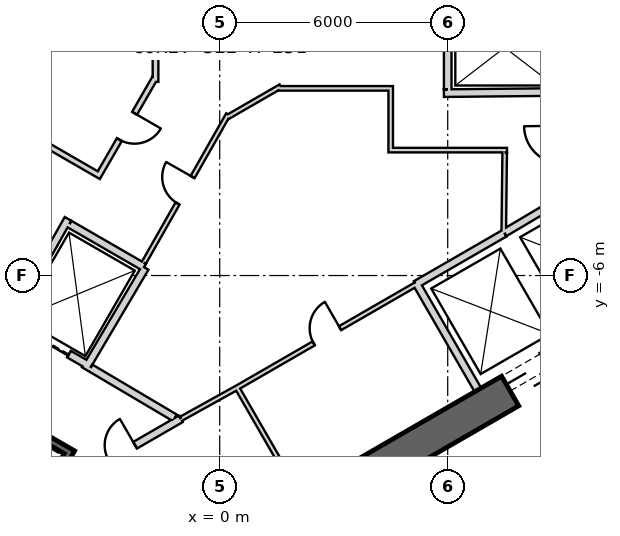
"""IFC4 building model, lengths in metres.
Left out: names, types, materials, properties, quantities, classifications, styles, units other than length and angle.
Written with IfcOpenShell. Run it as: python <this file> out.ifc"""

import sys

from ifc_helpers import new_model, si_unit, direction, frame, frame_2d, origin, place, context, subcontext, project, spatial, rectangle, extrude, element, fill, save


model = new_model("IFC4")
c1 = context("Model", 3, precision=1e-05, world=origin(), true_north=direction((0.0, 1.0)))
c2 = subcontext(c1, "Body", "Model", "MODEL_VIEW")
j1 = project(units=[si_unit("LENGTHUNIT", "METRE"), si_unit("PLANEANGLEUNIT", "RADIAN")], contexts=[c1])
p1 = place(None, origin())
s1 = spatial("IfcSite", under=j1, at=p1, CompositionType="ELEMENT")
p2 = place(p1, origin())
s2 = spatial("IfcBuilding", under=s1, at=p2, CompositionType="ELEMENT")
p3 = place(p2, frame((0.0, 0.0, 415.3)))
s3 = spatial("IfcBuildingStorey", under=s2, at=p3, CompositionType="ELEMENT", Elevation=415.3)
p4 = place(p3, frame((-7.825, -17.97, 0.0), z_axis=(0.0, 0.0, 1.0), x_axis=(0.866028369851, 0.499994862586, 0.0)))
e1 = element("IfcWall", 1, at=p4, inside=s3, PredefinedType="SHEAR", context=c2, shape_type="SweptSolid", body=[
    extrude(rectangle(XDim=31.523, YDim=0.9, at=frame_2d((15.762, 0.0))), origin(), (0.0, 0.0, 1.0), 5.0),
])
p5 = place(p4, frame((17.862, 0.0, 0.0)))
e2 = element("IfcOpeningElement", 2, at=p5, cuts=e1, PredefinedType="OPENING", context=c2, shape_type="SweptSolid", body=[
    extrude(rectangle(XDim=1.2, YDim=2.4, at=frame_2d((0.6, 1.2))), frame((0.0, 0.46, 0.0), z_axis=(0.0, -1.0, 0.0), x_axis=(1.0, 0.0, 0.0)), (0.0, 0.0, 1.0), 0.92),
])
p6 = place(p4, frame((20.562, 0.0, 0.0)))
e3 = element("IfcOpeningElement", 3, at=p6, cuts=e1, PredefinedType="OPENING", context=c2, shape_type="SweptSolid", body=[
    extrude(rectangle(XDim=1.2, YDim=2.4, at=frame_2d((0.6, 1.2))), frame((0.0, 0.46, 0.0), z_axis=(0.0, -1.0, 0.0), x_axis=(1.0, 0.0, 0.0)), (0.0, 0.0, 1.0), 0.92),
])
p7 = place(p4, frame((26.712, 0.0, 0.0)))
e4 = element("IfcOpeningElement", 4, at=p7, cuts=e1, PredefinedType="OPENING", context=c2, shape_type="SweptSolid", body=[
    extrude(rectangle(XDim=1.2, YDim=2.4, at=frame_2d((0.6, 1.2))), frame((0.0, 0.46, 0.0), z_axis=(0.0, -1.0, 0.0), x_axis=(1.0, 0.0, 0.0)), (0.0, 0.0, 1.0), 0.92),
])
p8 = place(p4, frame((3.612, 0.0, 0.0)))
e5 = element("IfcOpeningElement", 5, at=p8, cuts=e1, PredefinedType="OPENING", context=c2, shape_type="SweptSolid", body=[
    extrude(rectangle(XDim=1.2, YDim=2.4, at=frame_2d((0.6, 1.2))), frame((0.0, 0.46, 0.0), z_axis=(0.0, -1.0, 0.0), x_axis=(1.0, 0.0, 0.0)), (0.0, 0.0, 1.0), 0.92),
])
p9 = place(p3, frame((-1.098, -22.052, 0.0), z_axis=(0.0, 0.0, 1.0), x_axis=(0.824476827337, 0.565895715821, 0.0)))
e6 = element("IfcWall", 6, at=p9, inside=s3, PredefinedType="SOLIDWALL", context=c2, shape_type="SweptSolid", body=[
    extrude(rectangle(XDim=24.031, YDim=0.24, at=frame_2d((12.016, 0.0))), origin(), (0.0, 0.0, 1.0), 4.75),
])
p10 = place(p3, frame((20.109, -8.849, 0.04), z_axis=(0.0, 0.0, 1.0), x_axis=(-0.824476642241, -0.565895985494, 0.0)))
e7 = element("IfcWall", 7, at=p10, inside=s3, PredefinedType="PARAPET", context=c2, shape_type="SweptSolid", body=[
    extrude(rectangle(XDim=26.04, YDim=0.25, at=frame_2d((13.02, 0.0))), origin(), (0.0, 0.0, 1.0), 1.2),
])
p11 = place(p3, frame((19.357, -8.698, 0.04), z_axis=(0.0, 0.0, 1.0), x_axis=(-0.824477152259, -0.565895242428, 0.0)))
e8 = element("IfcWall", 8, at=p11, inside=s3, PredefinedType="PARAPET", context=c2, shape_type="SweptSolid", body=[
    extrude(rectangle(XDim=24.864, YDim=0.5, at=frame_2d((12.432, 0.0))), origin(), (0.0, 0.0, 1.0), 0.6),
])
p12 = place(p3, frame((6.795, -9.01, 0.0), z_axis=(0.0, 0.0, 1.0), x_axis=(-0.499984717929, 0.866034226713, 0.0)))
e9 = element("IfcWall", 9, at=p12, inside=s3, PredefinedType="PLUMBINGWALL", context=c2, shape_type="SweptSolid", body=[
    extrude(rectangle(XDim=3.25, YDim=0.2, at=frame_2d((1.625, 0.0))), origin(), (0.0, 0.0, 1.0), 4.75),
])
p13 = place(p3, frame((5.159, -6.236, 0.0), z_axis=(0.0, 0.0, 1.0), x_axis=(0.866036505625, 0.499980770555, 0.0)))
e10 = element("IfcWall", 10, at=p13, inside=s3, PredefinedType="PLUMBINGWALL", context=c2, shape_type="SweptSolid", body=[
    extrude(rectangle(XDim=2.7, YDim=0.2, at=frame_2d((1.35, 0.0))), origin(), (0.0, 0.0, 1.0), 4.75),
])
p14 = place(p3, frame((7.493, -4.878, 0.0), z_axis=(0.0, 0.0, 1.0), x_axis=(0.859981807212, 0.510324691999, 0.0)))
e11 = element("IfcWall", 11, at=p14, inside=s3, PredefinedType="PLUMBINGWALL", context=c2, shape_type="SweptSolid", body=[
    extrude(rectangle(XDim=1.845, YDim=0.2, at=frame_2d((0.922, 0.0))), origin(), (0.0, 0.0, 1.0), 4.75),
])
p15 = place(p3, frame((5.9, -1.201, 0.0), z_axis=(0.0, 0.0, 1.0), x_axis=(0.999950064753, 0.009993397809, 0.0)))
e12 = element("IfcWall", 12, at=p15, inside=s3, PredefinedType="PLUMBINGWALL", context=c2, shape_type="SweptSolid", body=[
    extrude(rectangle(XDim=3.2, YDim=0.2, at=frame_2d((1.6, 0.0))), origin(), (0.0, 0.0, 1.0), 4.75),
])
p16 = place(p3, frame((6.0, -1.1, 0.0), z_axis=(0.0, 0.0, 1.0), x_axis=(0.0, 1.0, 0.0)))
e13 = element("IfcWall", 13, at=p16, inside=s3, PredefinedType="PLUMBINGWALL", context=c2, shape_type="SweptSolid", body=[
    extrude(rectangle(XDim=2.28, YDim=0.2, at=frame_2d((1.14, 0.0))), origin(), (0.0, 0.0, 1.0), 4.75),
])
p17 = place(p3, frame((-3.905, -10.563, -0.25), z_axis=(0.0, 0.0, 1.0), x_axis=(-0.500012932018, -0.866017937352, 0.0)))
e14 = element("IfcWall", 14, at=p17, inside=s3, PredefinedType="SHEAR", context=c2, shape_type="SweptSolid", body=[
    extrude(rectangle(XDim=8.1, YDim=0.2, at=frame_2d((4.05, 0.0))), origin(), (0.0, 0.0, 1.0), 5.0),
])
p18 = place(p3, frame((-4.041, -10.599, -0.25), z_axis=(0.0, 0.0, 1.0), x_axis=(-0.866047807691, 0.499961193289, 0.0)))
e15 = element("IfcWall", 15, at=p18, inside=s3, PredefinedType="SHEAR", context=c2, shape_type="SweptSolid", body=[
    extrude(rectangle(XDim=3.6, YDim=0.2, at=frame_2d((1.8, 0.0))), origin(), (0.0, 0.0, 1.0), 5.0),
])
p19 = place(p18, frame((1.25, 0.0, 0.25)))
e16 = element("IfcOpeningElement", 16, at=p19, cuts=e15, PredefinedType="OPENING", context=c2, shape_type="SweptSolid", body=[
    extrude(rectangle(XDim=1.1, YDim=2.1, at=frame_2d((0.55, 1.05))), frame((0.0, 0.11, 0.0), z_axis=(0.0, -1.0, 0.0), x_axis=(1.0, 0.0, 0.0)), (0.0, 0.0, 1.0), 0.22),
])
p20 = place(p3, frame((-3.446, -8.368, 0.0), z_axis=(0.0, 0.0, 1.0), x_axis=(-0.866024647952, 0.500001309137, 0.0)))
e17 = element("IfcWall", 17, at=p20, inside=s3, PredefinedType="PLUMBINGWALL", context=c2, shape_type="SweptSolid", body=[
    extrude(rectangle(XDim=2.4, YDim=0.2, at=frame_2d((1.2, 0.0))), origin(), (0.0, 0.0, 1.0), 4.75),
])
p21 = place(p20, frame((0.6, 0.0, 0.0)))
e18 = element("IfcOpeningElement", 18, at=p21, cuts=e17, PredefinedType="OPENING", context=c2, shape_type="SweptSolid", body=[
    extrude(rectangle(XDim=1.2, YDim=2.4, at=frame_2d((0.6, 1.2))), frame((0.0, 0.11, 0.0), z_axis=(0.0, -1.0, 0.0), x_axis=(1.0, 0.0, 0.0)), (0.0, 0.0, 1.0), 0.22),
])
p22 = place(p3, frame((-1.961, -5.796, 0.0), z_axis=(0.0, 0.0, 1.0), x_axis=(-0.508647062354, -0.860975125052, 0.0)))
e19 = element("IfcWall", 19, at=p22, inside=s3, PredefinedType="PLUMBINGWALL", context=c2, shape_type="SweptSolid", body=[
    extrude(rectangle(XDim=3.1, YDim=0.2, at=frame_2d((1.55, 0.0))), origin(), (0.0, 0.0, 1.0), 4.75),
])
p23 = place(p3, frame((-3.99, -4.509, 0.0), z_axis=(0.0, 0.0, 1.0), x_axis=(-0.491358283181, -0.870957540612, 0.0)))
e20 = element("IfcWall", 20, at=p23, inside=s3, PredefinedType="PLUMBINGWALL", context=c2, shape_type="SweptSolid", body=[
    extrude(rectangle(XDim=3.2, YDim=0.2, at=frame_2d((1.6, 0.0))), origin(), (0.0, 0.0, 1.0), 4.75),
])
p24 = place(p3, frame((-3.953, -4.646, 0.0), z_axis=(0.0, 0.0, 1.0), x_axis=(0.866065302921, -0.4999308863, 0.0)))
e21 = element("IfcWall", 21, at=p24, inside=s3, PredefinedType="PLUMBINGWALL", context=c2, shape_type="SweptSolid", body=[
    extrude(rectangle(XDim=2.264, YDim=0.2, at=frame_2d((1.132, 0.0))), origin(), (0.0, 0.0, 1.0), 4.75),
])
p25 = place(p3, frame((2.067, -11.74, 0.0), z_axis=(0.0, 0.0, 1.0), x_axis=(-0.499984717929, 0.866034226713, 0.0)))
e22 = element("IfcWall", 22, at=p25, inside=s3, PredefinedType="PARTITIONING", context=c2, shape_type="SweptSolid", body=[
    extrude(rectangle(XDim=3.25, YDim=0.12, at=frame_2d((1.625, 0.0))), origin(), (0.0, 0.0, 1.0), 4.75),
])
p26 = place(p3, frame((-1.024, -9.771, 0.0), z_axis=(0.0, 0.0, 1.0), x_axis=(-0.866029903013, -0.499992207027, 0.0)))
e23 = element("IfcWall", 23, at=p26, inside=s3, PredefinedType="PARTITIONING", context=c2, shape_type="SweptSolid", body=[
    extrude(rectangle(XDim=3.578, YDim=0.2, at=frame_2d((1.789, 0.0))), origin(), (0.0, 0.0, 1.0), 4.75),
])
p27 = place(p26, frame((1.389, 0.0, 0.0)))
e24 = element("IfcOpeningElement", 24, at=p27, cuts=e23, PredefinedType="OPENING", context=c2, shape_type="SweptSolid", body=[
    extrude(rectangle(XDim=0.8, YDim=2.1, at=frame_2d((0.4, 1.05))), frame((0.0, 0.11, 0.0), z_axis=(0.0, -1.0, 0.0), x_axis=(1.0, 0.0, 0.0)), (0.0, 0.0, 1.0), 0.22),
])
p28 = place(p3, frame((-1.023, -9.772, 0.0), z_axis=(0.0, 0.0, 1.0), x_axis=(0.874290944206, 0.485402250592, 0.0)))
e25 = element("IfcWall", 25, at=p28, inside=s3, PredefinedType="PARTITIONING", context=c2, shape_type="SweptSolid", body=[
    extrude(rectangle(XDim=1.723, YDim=0.12, at=frame_2d((0.861, 0.0))), origin(), (0.0, 0.0, 1.0), 4.75),
])
p29 = place(p3, frame((0.483, -8.936, 0.0), z_axis=(0.0, 0.0, 1.0), x_axis=(0.866028230842, 0.499995103361, 0.0)))
e26 = element("IfcWall", 26, at=p29, inside=s3, PredefinedType="PARTITIONING", context=c2, shape_type="SweptSolid", body=[
    extrude(rectangle(XDim=5.4, YDim=0.12, at=frame_2d((2.7, 0.0))), origin(), (0.0, 0.0, 1.0), 4.75),
])
p30 = place(p29, frame((2.3, 0.0, 0.0)))
e27 = element("IfcOpeningElement", 27, at=p30, cuts=e26, PredefinedType="OPENING", context=c2, shape_type="SweptSolid", body=[
    extrude(rectangle(XDim=0.8, YDim=2.1, at=frame_2d((0.4, 1.05))), frame((0.0, 0.07, 0.0), z_axis=(0.0, -1.0, 0.0), x_axis=(1.0, 0.0, 0.0)), (0.0, 0.0, 1.0), 0.14),
])
p31 = place(p3, frame((-3.401, -8.43, 0.0), z_axis=(0.0, 0.0, 1.0), x_axis=(0.860630814782, -0.509229418482, 0.0)))
e28 = element("IfcWall", 28, at=p31, inside=s3, PredefinedType="PARTITIONING", context=c2, shape_type="SweptSolid", body=[
    extrude(rectangle(XDim=2.582, YDim=0.2, at=frame_2d((1.291, 0.0))), origin(), (0.0, 0.0, 1.0), 4.75),
])
p32 = place(p3, frame((0.224, -1.761, 0.0), z_axis=(0.0, 0.0, 1.0), x_axis=(-0.494327216836, -0.869275907118, 0.0)))
e29 = element("IfcWall", 29, at=p32, inside=s3, PredefinedType="PARTITIONING", context=c2, shape_type="SweptSolid", body=[
    extrude(rectangle(XDim=4.487, YDim=0.12, at=frame_2d((2.244, 0.0))), origin(), (0.0, 0.0, 1.0), 4.75),
])
p33 = place(p32, frame((1.895, 0.0, 0.0)))
e30 = element("IfcOpeningElement", 30, at=p33, cuts=e29, PredefinedType="OPENING", context=c2, shape_type="SweptSolid", body=[
    extrude(rectangle(XDim=0.8, YDim=2.1, at=frame_2d((0.4, 1.05))), frame((0.0, 0.07, 0.0), z_axis=(0.0, -1.0, 0.0), x_axis=(1.0, 0.0, 0.0)), (0.0, 0.0, 1.0), 0.14),
])
p34 = place(p3, frame((1.605, -1.023, 0.0), z_axis=(0.0, 0.0, 1.0), x_axis=(-0.866001581989, -0.50004125829, 0.0)))
e31 = element("IfcWall", 31, at=p34, inside=s3, PredefinedType="PARTITIONING", context=c2, shape_type="SweptSolid", body=[
    extrude(rectangle(XDim=1.635, YDim=0.12, at=frame_2d((0.817, 0.0))), origin(), (0.0, 0.0, 1.0), 4.75),
])
p35 = place(p3, frame((4.56, -1.075, 0.0), z_axis=(0.0, 0.0, 1.0), x_axis=(-1.0, 0.0, 0.0)))
e32 = element("IfcWall", 32, at=p35, inside=s3, PredefinedType="PARTITIONING", context=c2, shape_type="SweptSolid", body=[
    extrude(rectangle(XDim=3.026, YDim=0.12, at=frame_2d((1.513, 0.0))), origin(), (0.0, 0.0, 1.0), 4.75),
])
p36 = place(p3, frame((4.5, -2.76, 0.0), z_axis=(0.0, 0.0, 1.0), x_axis=(0.0, 1.0, 0.0)))
e33 = element("IfcWall", 33, at=p36, inside=s3, PredefinedType="PARTITIONING", context=c2, shape_type="SweptSolid", body=[
    extrude(rectangle(XDim=1.625, YDim=0.12, at=frame_2d((0.812, 0.0))), origin(), (0.0, 0.0, 1.0), 4.75),
])
p37 = place(p3, frame((7.56, -2.7, 0.0), z_axis=(0.0, 0.0, 1.0), x_axis=(-1.0, 0.0, 0.0)))
e34 = element("IfcWall", 34, at=p37, inside=s3, PredefinedType="PARTITIONING", context=c2, shape_type="SweptSolid", body=[
    extrude(rectangle(XDim=3.0, YDim=0.12, at=frame_2d((1.5, 0.0))), origin(), (0.0, 0.0, 1.0), 4.75),
])
p38 = place(p3, frame((7.475, -4.865, 0.0), z_axis=(0.0, 0.0, 1.0), x_axis=(0.011716133148, 0.999931363757, 0.0)))
e35 = element("IfcWall", 35, at=p38, inside=s3, PredefinedType="PARTITIONING", context=c2, shape_type="SweptSolid", body=[
    extrude(rectangle(XDim=2.105, YDim=0.12, at=frame_2d((1.052, 0.0))), origin(), (0.0, 0.0, 1.0), 4.75),
])
p39 = place(p3, frame((-1.689, -0.905, 0.0), z_axis=(0.0, 0.0, 1.0), x_axis=(0.0, 1.0, 0.0)))
e36 = element("IfcWall", 36, at=p39, inside=s3, PredefinedType="PLUMBINGWALL", context=c2, shape_type="SweptSolid", body=[
    extrude(rectangle(XDim=1.656, YDim=0.15, at=frame_2d((0.828, 0.0))), origin(), (0.0, 0.0, 1.0), 4.75),
])
p40 = place(p3, frame((-3.219, -3.425, 0.0), z_axis=(0.0, 0.0, 1.0), x_axis=(0.499996236806, 0.866027576455, 0.0)))
e37 = element("IfcWall", 37, at=p40, inside=s3, PredefinedType="PLUMBINGWALL", context=c2, shape_type="SweptSolid", body=[
    extrude(rectangle(XDim=3.036, YDim=0.15, at=frame_2d((1.518, 0.0))), origin(), (0.0, 0.0, 1.0), 4.75),
])
p41 = place(p40, frame((1.156, 0.0, 0.0)))
e38 = element("IfcOpeningElement", 38, at=p41, cuts=e37, PredefinedType="OPENING", context=c2, shape_type="SweptSolid", body=[
    extrude(rectangle(XDim=0.8, YDim=2.1, at=frame_2d((0.4, 1.05))), frame((0.0, 0.085, 0.0), z_axis=(0.0, -1.0, 0.0), x_axis=(1.0, 0.0, 0.0)), (0.0, 0.0, 1.0), 0.17),
])
p42 = place(p3, frame((-4.653, -2.51, 0.0), z_axis=(0.0, 0.0, 1.0), x_axis=(0.866053003207, -0.499952193351, 0.0)))
e39 = element("IfcWall", 39, at=p42, inside=s3, PredefinedType="PLUMBINGWALL", context=c2, shape_type="SweptSolid", body=[
    extrude(rectangle(XDim=1.625, YDim=0.15, at=frame_2d((0.812, 0.0))), origin(), (0.0, 0.0, 1.0), 4.75),
])
p43 = place(p21, origin())
e40 = element("IfcDoor", 40, at=p43, inside=s3, OperationType="SLIDING_TO_LEFT", PredefinedType="USERDEFINED", context=c2, shape_type="SweptSolid", body=[
    extrude(rectangle(XDim=1.2, YDim=2.4, at=frame_2d((0.6, 1.2))), frame((0.0, 0.025, 0.0), z_axis=(0.0, -1.0, 0.0), x_axis=(1.0, 0.0, 0.0)), (0.0, 0.0, 1.0), 0.05),
])
fill(e18, e40)
p44 = place(p33, origin())
e41 = element("IfcDoor", 41, at=p44, inside=s3, OperationType="SINGLE_SWING_LEFT", PredefinedType="USERDEFINED", context=c2, shape_type="SweptSolid", body=[
    extrude(rectangle(XDim=0.8, YDim=2.1, at=frame_2d((0.4, 1.05))), frame((0.0, 0.025, 0.0), z_axis=(0.0, -1.0, 0.0), x_axis=(1.0, 0.0, 0.0)), (0.0, 0.0, 1.0), 0.05),
])
fill(e30, e41)
p45 = place(p41, origin())
e42 = element("IfcDoor", 42, at=p45, inside=s3, OperationType="SINGLE_SWING_RIGHT", PredefinedType="USERDEFINED", context=c2, shape_type="SweptSolid", body=[
    extrude(rectangle(XDim=0.8, YDim=2.1, at=frame_2d((0.4, 1.05))), frame((0.0, 0.025, 0.0), z_axis=(0.0, -1.0, 0.0), x_axis=(1.0, 0.0, 0.0)), (0.0, 0.0, 1.0), 0.05),
])
fill(e38, e42)
p46 = place(p27, origin())
e43 = element("IfcDoor", 43, at=p46, inside=s3, OperationType="SINGLE_SWING_LEFT", PredefinedType="USERDEFINED", context=c2, shape_type="SweptSolid", body=[
    extrude(rectangle(XDim=0.8, YDim=2.1, at=frame_2d((0.4, 1.05))), frame((0.0, 0.025, 0.0), z_axis=(0.0, -1.0, 0.0), x_axis=(1.0, 0.0, 0.0)), (0.0, 0.0, 1.0), 0.05),
])
fill(e24, e43)
p47 = place(p30, origin())
e44 = element("IfcDoor", 44, at=p47, inside=s3, OperationType="SINGLE_SWING_RIGHT", PredefinedType="USERDEFINED", context=c2, shape_type="SweptSolid", body=[
    extrude(rectangle(XDim=0.8, YDim=2.1, at=frame_2d((0.4, 1.05))), frame((0.0, 0.025, 0.0), z_axis=(0.0, -1.0, 0.0), x_axis=(1.0, 0.0, 0.0)), (0.0, 0.0, 1.0), 0.05),
])
fill(e27, e44)
p48 = place(p5, origin())
e45 = element("IfcDoor", 45, at=p48, inside=s3, OperationType="SLIDING_TO_LEFT", PredefinedType="USERDEFINED", context=c2, shape_type="SweptSolid", body=[
    extrude(rectangle(XDim=1.2, YDim=2.4, at=frame_2d((0.6, 1.2))), frame((0.0, 0.025, 0.0), z_axis=(0.0, -1.0, 0.0), x_axis=(1.0, 0.0, 0.0)), (0.0, 0.0, 1.0), 0.05),
])
fill(e2, e45)
save(model, sys.argv[1])
